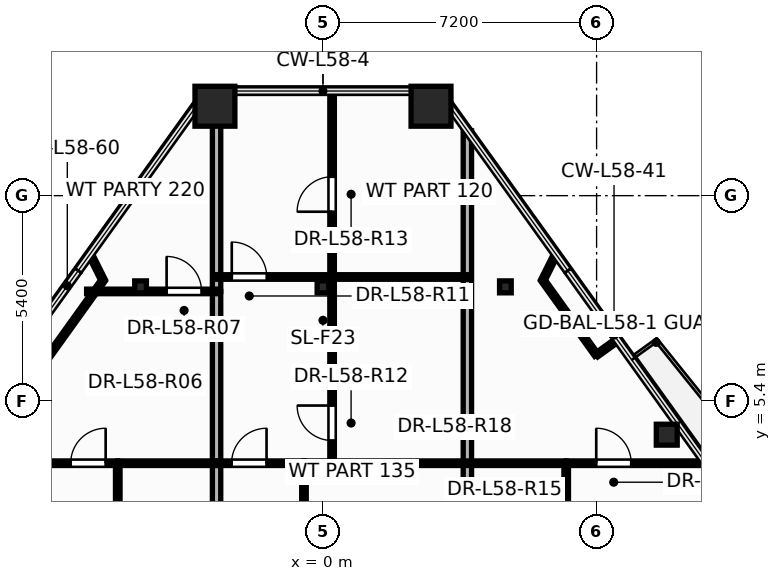
"""IFC4 building model, lengths in metres.
Left out: names, types, materials, properties, quantities, classifications, styles, units other than length and angle.
Written with IfcOpenShell. Run it as: python <this file> out.ifc"""

import sys

from ifc_helpers import new_model, si_unit, direction, frame, frame_2d, origin, origin_2d, place, context, subcontext, project, spatial, rectangle, hollow_rectangle, hollow_circle, i_section, extrude, element, fill, save


model = new_model("IFC4")
c1 = context("Model", 3, precision=1e-05, world=origin(), true_north=direction((0.0, 1.0)))
c2 = subcontext(c1, "Body", "Model", "MODEL_VIEW")
j1 = project(units=[si_unit("LENGTHUNIT", "METRE"), si_unit("PLANEANGLEUNIT", "RADIAN")], contexts=[c1])
p1 = place(None, origin())
s1 = spatial("IfcSite", under=j1, at=p1, CompositionType="ELEMENT")
p2 = place(p1, origin())
s2 = spatial("IfcBuilding", under=s1, at=p2, CompositionType="ELEMENT")
p3 = place(p2, frame((0.0, 0.0, 221.7)))
s3 = spatial("IfcBuildingStorey", under=s2, at=p3, CompositionType="ELEMENT", Elevation=221.7)
for number, where, z_axis, x_axis in (
    (1, (2.843, 13.153, 0.0), (0.0, 0.0, 1.0), (1.0, 0.0, 0.0)),
    (2, (-2.843, 13.153, 0.0), (0.0, 0.0, 1.0), (1.0, 0.0, 0.0)),
):
    element("IfcColumn", number, at=place(p3, frame(where, z_axis=z_axis, x_axis=x_axis)), inside=s3, PredefinedType="COLUMN", context=c2, shape_type="SweptSolid", body=[
        extrude(hollow_rectangle(XDim=1.05, YDim=1.05, WallThickness=0.045, at=origin_2d()), origin(), (0.0, 0.0, 1.0), 3.6),
    ])
p4 = place(p3, frame((9.046, 4.51, 0.0), z_axis=(0.0, 0.0, 1.0), x_axis=(1.0, 0.0, 0.0)))
e3 = element("IfcColumn", 3, at=p4, inside=s3, PredefinedType="COLUMN", context=c2, shape_type="SweptSolid", body=[
    extrude(hollow_circle(Radius=0.275, WallThickness=0.024, at=origin_2d()), origin(), (0.0, 0.0, 1.0), 3.6),
])
for number, where, z_axis, x_axis in (
    (4, (-4.8, 8.4, 0.0), (0.0, 0.0, 1.0), (1.0, 0.0, 0.0)),
    (5, (0.0, 8.4, 0.0), (0.0, 0.0, 1.0), (1.0, 0.0, 0.0)),
    (6, (4.8, 8.4, 0.0), (0.0, 0.0, 1.0), (1.0, 0.0, 0.0)),
):
    element("IfcColumn", number, at=place(p3, frame(where, z_axis=z_axis, x_axis=x_axis)), inside=s3, PredefinedType="COLUMN", context=c2, shape_type="SweptSolid", body=[
        extrude(i_section(OverallWidth=0.307, OverallDepth=0.314, WebThickness=0.012, FlangeThickness=0.019, at=origin_2d()), origin(), (0.0, 0.0, 1.0), 3.6),
    ])
p5 = place(p3, frame((-2.8, 8.28, 0.0), z_axis=(0.0, 0.0, 1.0), x_axis=(0.0, 1.0, 0.0)))
e7 = element("IfcWall", 7, at=p5, inside=s3, PredefinedType="PARTITIONING", context=c2, shape_type="SweptSolid", body=[
    extrude(rectangle(XDim=5.273, YDim=0.22, at=frame_2d((2.636, 0.0))), origin(), (0.0, 0.0, 1.0), 2.62),
])
p6 = place(p3, frame((0.24, 3.76, 0.0), z_axis=(0.0, 0.0, 1.0), x_axis=(0.0, 1.0, 0.0)))
e8 = element("IfcWall", 8, at=p6, inside=s3, PredefinedType="PARTITIONING", context=c2, shape_type="SweptSolid", body=[
    extrude(rectangle(XDim=4.9, YDim=0.12, at=frame_2d((2.45, 0.0))), origin(), (0.0, 0.0, 1.0), 2.32),
])
p7 = place(p6, frame((0.597, 0.0, 0.0)))
e9 = element("IfcOpeningElement", 9, at=p7, cuts=e8, PredefinedType="OPENING", context=c2, shape_type="SweptSolid", body=[
    extrude(rectangle(XDim=0.926, YDim=2.104, at=frame_2d((0.46, 1.052))), frame((0.0, 0.07, 0.0), z_axis=(0.0, -1.0, 0.0), x_axis=(1.0, 0.0, 0.0)), (0.0, 0.0, 1.0), 0.14),
])
p8 = place(p3, frame((3.8, -2.76, 0.0), z_axis=(0.0, 0.0, 1.0), x_axis=(0.0, 1.0, 0.0)))
e10 = element("IfcWall", 10, at=p8, inside=s3, PredefinedType="PARTITIONING", context=c2, shape_type="SweptSolid", body=[
    extrude(rectangle(XDim=15.266, YDim=0.22, at=frame_2d((7.633, 0.0))), origin(), (0.0, 0.0, 1.0), 2.32),
])
p9 = place(p3, frame((0.24, 8.66, 0.0), z_axis=(0.0, 0.0, 1.0), x_axis=(0.0, 1.0, 0.0)))
e11 = element("IfcWall", 11, at=p9, inside=s3, PredefinedType="PARTITIONING", context=c2, shape_type="SweptSolid", body=[
    extrude(rectangle(XDim=4.893, YDim=0.12, at=frame_2d((2.447, 0.0))), origin(), (0.0, 0.0, 1.0), 2.863),
])
p10 = place(p9, frame((1.717, 0.0, 0.0)))
e12 = element("IfcOpeningElement", 12, at=p10, cuts=e11, PredefinedType="OPENING", context=c2, shape_type="SweptSolid", body=[
    extrude(rectangle(XDim=0.926, YDim=2.104, at=frame_2d((0.46, 1.052))), frame((0.0, 0.07, 0.0), z_axis=(0.0, -1.0, 0.0), x_axis=(1.0, 0.0, 0.0)), (0.0, 0.0, 1.0), 0.14),
])
p11 = place(p3, frame((-10.077, 3.76, 0.0), z_axis=(0.0, 0.0, 1.0), x_axis=(1.0, 0.0, 0.0)))
e13 = element("IfcWall", 13, at=p11, inside=s3, PredefinedType="PARTITIONING", context=c2, shape_type="SweptSolid", body=[
    extrude(rectangle(XDim=4.677, YDim=0.12, at=frame_2d((2.339, 0.0))), origin(), (0.0, 0.0, 1.0), 2.62),
])
p12 = place(p11, frame((3.439, 0.0, 0.0)))
e14 = element("IfcOpeningElement", 14, at=p12, cuts=e13, PredefinedType="OPENING", context=c2, shape_type="SweptSolid", body=[
    extrude(rectangle(XDim=0.926, YDim=2.104, at=frame_2d((0.46, 1.052))), frame((0.0, 0.07, 0.0), z_axis=(0.0, -1.0, 0.0), x_axis=(1.0, 0.0, 0.0)), (0.0, 0.0, 1.0), 0.14),
])
p13 = place(p3, frame((-2.8, -2.76, 0.0), z_axis=(0.0, 0.0, 1.0), x_axis=(0.0, 1.0, 0.0)))
e15 = element("IfcWall", 15, at=p13, inside=s3, PredefinedType="PARTITIONING", context=c2, shape_type="SweptSolid", body=[
    extrude(rectangle(XDim=11.04, YDim=0.22, at=frame_2d((5.52, 0.0))), origin(), (0.0, 0.0, 1.0), 2.32),
])
p14 = place(p3, frame((6.4, 3.76, 0.0), z_axis=(0.0, 0.0, 1.0), x_axis=(1.0, 0.0, 0.0)))
e16 = element("IfcWall", 16, at=p14, inside=s3, PredefinedType="PARTITIONING", context=c2, shape_type="SweptSolid", body=[
    extrude(rectangle(XDim=3.677, YDim=0.12, at=frame_2d((1.839, 0.0))), origin(), (0.0, 0.0, 1.0), 2.62),
])
p15 = place(p14, frame((0.791, 0.0, 0.0)))
e17 = element("IfcOpeningElement", 17, at=p15, cuts=e16, PredefinedType="OPENING", context=c2, shape_type="SweptSolid", body=[
    extrude(rectangle(XDim=0.926, YDim=2.104, at=frame_2d((0.46, 1.052))), frame((0.0, 0.07, 0.0), z_axis=(0.0, -1.0, 0.0), x_axis=(1.0, 0.0, 0.0)), (0.0, 0.0, 1.0), 0.14),
])
p16 = place(p3, frame((-0.5, 3.76, 0.0), z_axis=(0.0, 0.0, 1.0), x_axis=(1.0, 0.0, 0.0)))
e18 = element("IfcWall", 18, at=p16, inside=s3, PredefinedType="PARTITIONING", context=c2, shape_type="SweptSolid", body=[
    extrude(rectangle(XDim=6.9, YDim=0.12, at=frame_2d((3.45, 0.0))), origin(), (0.0, 0.0, 1.0), 2.32),
])
p17 = place(p3, frame((-5.4, 0.16, 0.0), z_axis=(0.0, 0.0, 1.0), x_axis=(0.0, 1.0, 0.0)))
e19 = element("IfcWall", 19, at=p17, inside=s3, PredefinedType="PARTITIONING", context=c2, shape_type="SweptSolid", body=[
    extrude(rectangle(XDim=3.6, YDim=0.12, at=frame_2d((1.8, 0.0))), origin(), (0.0, 0.0, 1.0), 2.32),
])
p18 = place(p17, frame((0.36, 0.0, 0.0)))
e20 = element("IfcOpeningElement", 20, at=p18, cuts=e19, PredefinedType="OPENING", context=c2, shape_type="SweptSolid", body=[
    extrude(rectangle(XDim=0.926, YDim=2.104, at=frame_2d((0.46, 1.052))), frame((0.0, 0.07, 0.0), z_axis=(0.0, -1.0, 0.0), x_axis=(1.0, 0.0, 0.0)), (0.0, 0.0, 1.0), 0.14),
])
p19 = place(p3, frame((-0.5, 0.16, 0.0), z_axis=(0.0, 0.0, 1.0), x_axis=(0.0, 1.0, 0.0)))
e21 = element("IfcWall", 21, at=p19, inside=s3, PredefinedType="PARTITIONING", context=c2, shape_type="SweptSolid", body=[
    extrude(rectangle(XDim=3.6, YDim=0.12, at=frame_2d((1.8, 0.0))), origin(), (0.0, 0.0, 1.0), 2.32),
])
p20 = place(p19, frame((0.32, 0.0, 0.0)))
e22 = element("IfcOpeningElement", 22, at=p20, cuts=e21, PredefinedType="OPENING", context=c2, shape_type="SweptSolid", body=[
    extrude(rectangle(XDim=0.926, YDim=2.104, at=frame_2d((0.46, 1.052))), frame((0.0, 0.07, 0.0), z_axis=(0.0, -1.0, 0.0), x_axis=(1.0, 0.0, 0.0)), (0.0, 0.0, 1.0), 0.14),
])
p21 = place(p3, frame((6.4, 0.16, 0.0), z_axis=(0.0, 0.0, 1.0), x_axis=(0.0, 1.0, 0.0)))
e23 = element("IfcWall", 23, at=p21, inside=s3, PredefinedType="PARTITIONING", context=c2, shape_type="SweptSolid", body=[
    extrude(rectangle(XDim=3.6, YDim=0.12, at=frame_2d((1.8, 0.0))), origin(), (0.0, 0.0, 1.0), 2.32),
])
p22 = place(p21, frame((0.32, 0.0, 0.0)))
e24 = element("IfcOpeningElement", 24, at=p22, cuts=e23, PredefinedType="OPENING", context=c2, shape_type="SweptSolid", body=[
    extrude(rectangle(XDim=0.926, YDim=2.104, at=frame_2d((0.46, 1.052))), frame((0.0, 0.07, 0.0), z_axis=(0.0, -1.0, 0.0), x_axis=(1.0, 0.0, 0.0)), (0.0, 0.0, 1.0), 0.14),
])
p23 = place(p3, frame((0.24, 8.66, 0.0), z_axis=(0.0, 0.0, 1.0), x_axis=(1.0, 0.0, 0.0)))
e25 = element("IfcWall", 25, at=p23, inside=s3, PredefinedType="PARTITIONING", context=c2, shape_type="SweptSolid", body=[
    extrude(rectangle(XDim=3.56, YDim=0.12, at=frame_2d((1.78, 0.0))), origin(), (0.0, 0.0, 1.0), 3.345),
])
p24 = place(p3, frame((-6.22, 8.28, 0.0), z_axis=(0.0, 0.0, 1.0), x_axis=(1.0, 0.0, 0.0)))
e26 = element("IfcWall", 26, at=p24, inside=s3, PredefinedType="PARTITIONING", context=c2, shape_type="SweptSolid", body=[
    extrude(rectangle(XDim=3.42, YDim=0.12, at=frame_2d((1.71, 0.0))), origin(), (0.0, 0.0, 1.0), 2.62),
])
p25 = place(p24, frame((2.105, 0.0, 0.0)))
e27 = element("IfcOpeningElement", 27, at=p25, cuts=e26, PredefinedType="OPENING", context=c2, shape_type="SweptSolid", body=[
    extrude(rectangle(XDim=0.926, YDim=2.104, at=frame_2d((0.46, 1.052))), frame((0.0, 0.07, 0.0), z_axis=(0.0, -1.0, 0.0), x_axis=(1.0, 0.0, 0.0)), (0.0, 0.0, 1.0), 0.14),
])
p26 = place(p3, frame((-2.8, 8.66, 0.0), z_axis=(0.0, 0.0, 1.0), x_axis=(1.0, 0.0, 0.0)))
e28 = element("IfcWall", 28, at=p26, inside=s3, PredefinedType="PARTITIONING", context=c2, shape_type="SweptSolid", body=[
    extrude(rectangle(XDim=3.04, YDim=0.12, at=frame_2d((1.52, 0.0))), origin(), (0.0, 0.0, 1.0), 3.345),
])
p27 = place(p26, frame((0.4, 0.0, 0.0)))
e29 = element("IfcOpeningElement", 29, at=p27, cuts=e28, PredefinedType="OPENING", context=c2, shape_type="SweptSolid", body=[
    extrude(rectangle(XDim=0.926, YDim=2.104, at=frame_2d((0.46, 1.052))), frame((0.0, 0.07, 0.0), z_axis=(0.0, -1.0, 0.0), x_axis=(1.0, 0.0, 0.0)), (0.0, 0.0, 1.0), 0.14),
])
p28 = place(p3, frame((-5.4, 3.76, 0.0), z_axis=(0.0, 0.0, 1.0), x_axis=(1.0, 0.0, 0.0)))
e30 = element("IfcWall", 30, at=p28, inside=s3, PredefinedType="PARTITIONING", context=c2, shape_type="SweptSolid", body=[
    extrude(rectangle(XDim=2.6, YDim=0.12, at=frame_2d((1.3, 0.0))), origin(), (0.0, 0.0, 1.0), 3.345),
])
for number, where, z_axis, x_axis in (
    (31, (-5.785, 8.574, 0.0), (0.0, 0.0, 1.0), (-0.583, -0.812, 0.0)),
    (32, (7.197, 6.607, 0.0), (0.0, 0.0, 1.0), (-0.583, 0.812, 0.0)),
):
    element("IfcWall", number, at=place(p3, frame(where, z_axis=z_axis, x_axis=x_axis)), inside=s3, PredefinedType="PARTITIONING", context=c2, shape_type="SweptSolid", body=[
        extrude(rectangle(XDim=2.421, YDim=0.12, at=frame_2d((1.21, 0.0))), origin(), (0.0, 0.0, 1.0), 3.345),
    ])
p29 = place(p3, frame((-2.8, 3.76, 0.0), z_axis=(0.0, 0.0, 1.0), x_axis=(1.0, 0.0, 0.0)))
e33 = element("IfcWall", 33, at=p29, inside=s3, PredefinedType="PARTITIONING", context=c2, shape_type="SweptSolid", body=[
    extrude(rectangle(XDim=2.3, YDim=0.12, at=frame_2d((1.15, 0.0))), origin(), (0.0, 0.0, 1.0), 2.964),
])
p30 = place(p29, frame((0.395, 0.0, 0.0)))
e34 = element("IfcOpeningElement", 34, at=p30, cuts=e33, PredefinedType="OPENING", context=c2, shape_type="SweptSolid", body=[
    extrude(rectangle(XDim=0.926, YDim=2.104, at=frame_2d((0.46, 1.052))), frame((0.0, 0.07, 0.0), z_axis=(0.0, -1.0, 0.0), x_axis=(1.0, 0.0, 0.0)), (0.0, 0.0, 1.0), 0.14),
])
for number, where, z_axis, x_axis in (
    (35, (-6.124, 9.251, 0.0), (0.0, 0.0, 1.0), (0.447, -0.894, 0.0)),
    (36, (5.785, 8.574, 0.0), (0.0, 0.0, 1.0), (0.447, 0.894, 0.0)),
):
    element("IfcWall", number, at=place(p3, frame(where, z_axis=z_axis, x_axis=x_axis)), inside=s3, PredefinedType="PARTITIONING", context=c2, shape_type="SweptSolid", body=[
        extrude(rectangle(XDim=0.757, YDim=0.12, at=frame_2d((0.378, 0.0))), origin(), (0.0, 0.0, 1.0), 2.863),
    ])
p31 = place(p3, frame((7.741, 6.998, 0.0), z_axis=(0.0, 0.0, 1.0), x_axis=(-0.812549510699, -0.582892179277, 0.0)))
e37 = element("IfcWall", 37, at=p31, inside=s3, PredefinedType="PARTITIONING", context=c2, shape_type="SweptSolid", body=[
    extrude(rectangle(XDim=0.67, YDim=0.12, at=frame_2d((0.335, 0.0))), origin(), (0.0, 0.0, 1.0), 2.863),
])
p32 = place(p12, origin())
e38 = element("IfcDoor", 38, at=p32, inside=s3, OperationType="SINGLE_SWING_RIGHT", PredefinedType="DOOR", context=c2, shape_type="SweptSolid", body=[
    extrude(rectangle(XDim=0.92, YDim=2.1, at=frame_2d((0.46, 1.05))), frame((0.0, 0.025, 0.0), z_axis=(0.0, -1.0, 0.0), x_axis=(1.0, 0.0, 0.0)), (0.0, 0.0, 1.0), 0.05),
])
fill(e14, e38)
p33 = place(p25, origin())
e39 = element("IfcDoor", 39, at=p33, inside=s3, OperationType="SINGLE_SWING_LEFT", PredefinedType="DOOR", context=c2, shape_type="SweptSolid", body=[
    extrude(rectangle(XDim=0.92, YDim=2.1, at=frame_2d((0.46, 1.05))), frame((0.0, 0.025, 0.0), z_axis=(0.0, -1.0, 0.0), x_axis=(1.0, 0.0, 0.0)), (0.0, 0.0, 1.0), 0.05),
])
fill(e27, e39)
p34 = place(p27, origin())
e40 = element("IfcDoor", 40, at=p34, inside=s3, OperationType="SINGLE_SWING_LEFT", PredefinedType="DOOR", context=c2, shape_type="SweptSolid", body=[
    extrude(rectangle(XDim=0.92, YDim=2.1, at=frame_2d((0.46, 1.05))), frame((0.0, 0.025, 0.0), z_axis=(0.0, -1.0, 0.0), x_axis=(1.0, 0.0, 0.0)), (0.0, 0.0, 1.0), 0.05),
])
fill(e29, e40)
p35 = place(p7, origin())
e41 = element("IfcDoor", 41, at=p35, inside=s3, OperationType="SINGLE_SWING_RIGHT", PredefinedType="DOOR", context=c2, shape_type="SweptSolid", body=[
    extrude(rectangle(XDim=0.92, YDim=2.1, at=frame_2d((0.46, 1.05))), frame((0.0, 0.025, 0.0), z_axis=(0.0, -1.0, 0.0), x_axis=(1.0, 0.0, 0.0)), (0.0, 0.0, 1.0), 0.05),
])
fill(e9, e41)
p36 = place(p10, origin())
e42 = element("IfcDoor", 42, at=p36, inside=s3, OperationType="SINGLE_SWING_LEFT", PredefinedType="DOOR", context=c2, shape_type="SweptSolid", body=[
    extrude(rectangle(XDim=0.92, YDim=2.1, at=frame_2d((0.46, 1.05))), frame((0.0, 0.025, 0.0), z_axis=(0.0, -1.0, 0.0), x_axis=(1.0, 0.0, 0.0)), (0.0, 0.0, 1.0), 0.05),
])
fill(e12, e42)
p37 = place(p15, origin())
e43 = element("IfcDoor", 43, at=p37, inside=s3, OperationType="SINGLE_SWING_LEFT", PredefinedType="DOOR", context=c2, shape_type="SweptSolid", body=[
    extrude(rectangle(XDim=0.92, YDim=2.1, at=frame_2d((0.46, 1.05))), frame((0.0, 0.025, 0.0), z_axis=(0.0, -1.0, 0.0), x_axis=(1.0, 0.0, 0.0)), (0.0, 0.0, 1.0), 0.05),
])
fill(e17, e43)
p38 = place(p30, origin())
e44 = element("IfcDoor", 44, at=p38, inside=s3, OperationType="SINGLE_SWING_RIGHT", PredefinedType="DOOR", context=c2, shape_type="SweptSolid", body=[
    extrude(rectangle(XDim=0.92, YDim=2.1, at=frame_2d((0.46, 1.05))), frame((0.0, 0.025, 0.0), z_axis=(0.0, -1.0, 0.0), x_axis=(1.0, 0.0, 0.0)), (0.0, 0.0, 1.0), 0.05),
])
fill(e34, e44)
save(model, sys.argv[1])
